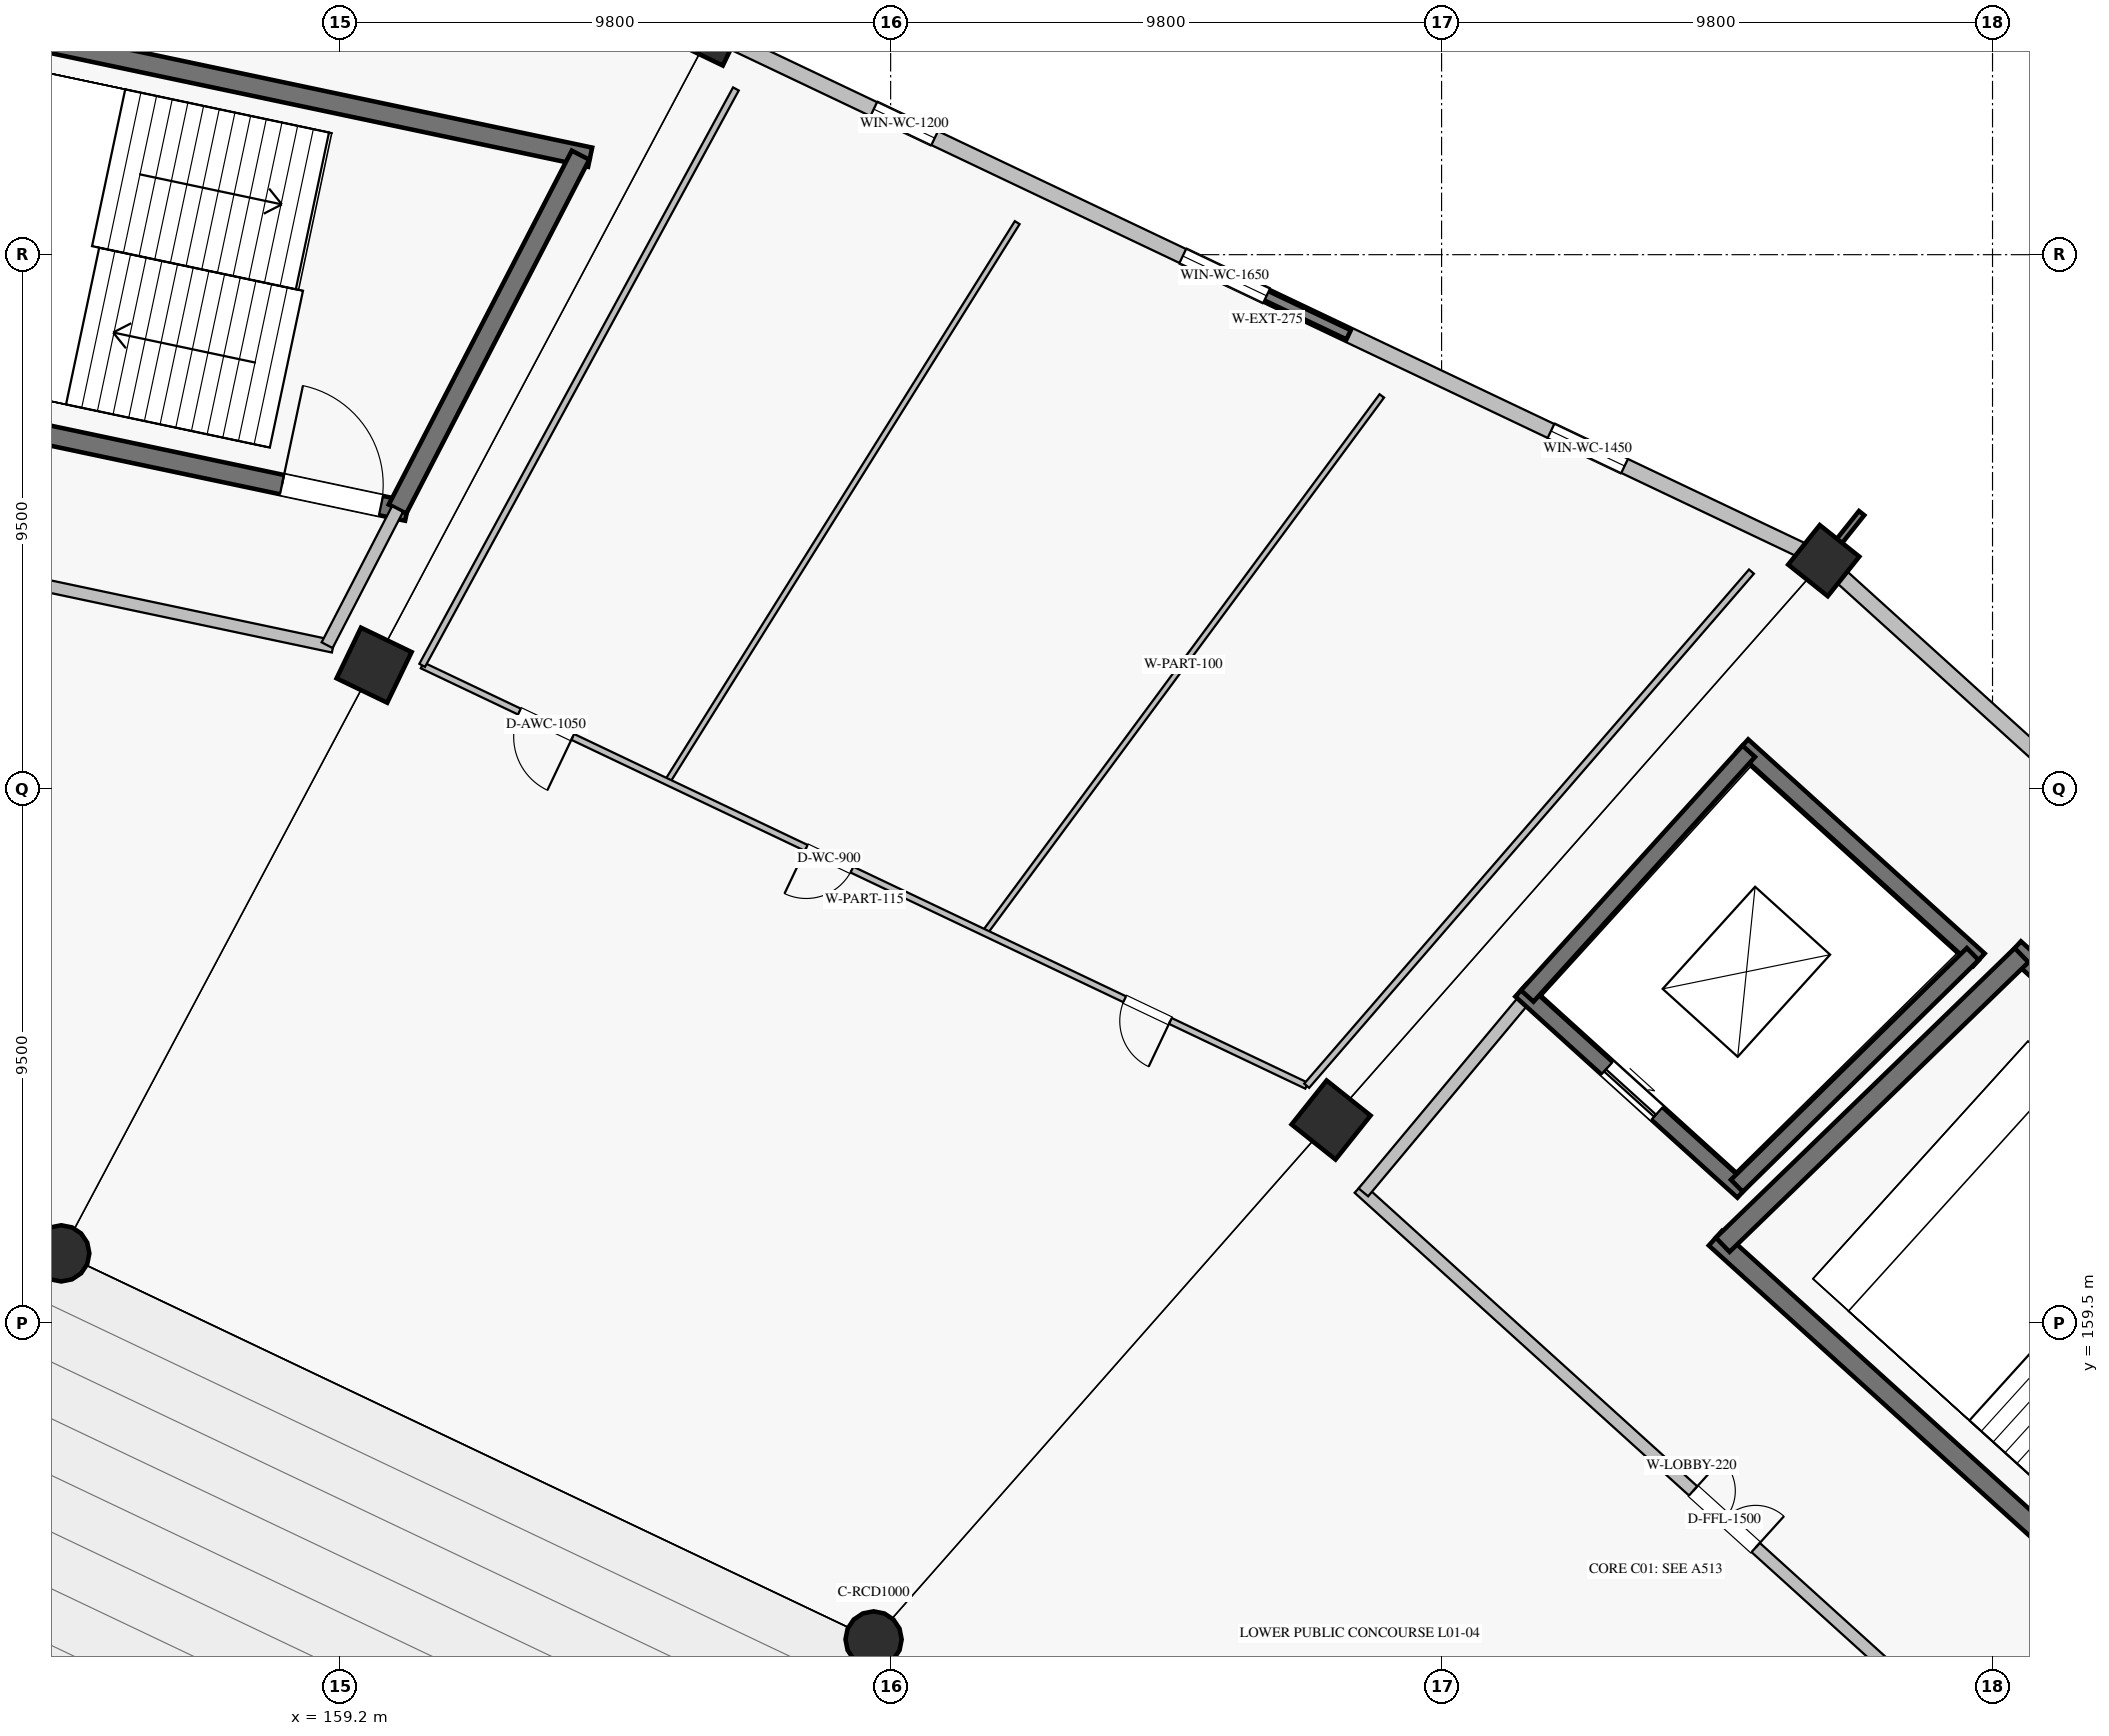
"""IFC4 building model, lengths in metres.
Left out: names, types, materials, properties, quantities, classifications, styles, units other than length and angle.
Written with IfcOpenShell. Run it as: python <this file> out.ifc"""

import sys

from ifc_helpers import new_model, si_unit, direction, frame, frame_2d, origin, origin_2d, place, context, subcontext, project, spatial, rectangle, circle, extrude, element, fill, save


model = new_model("IFC4")
c1 = context("Model", 3, precision=1e-05, world=origin(), true_north=direction((0.0, 1.0)))
c2 = subcontext(c1, "Body", "Model", "MODEL_VIEW")
j1 = project(units=[si_unit("LENGTHUNIT", "METRE"), si_unit("PLANEANGLEUNIT", "RADIAN")], contexts=[c1])
p1 = place(None, origin())
s1 = spatial("IfcSite", under=j1, at=p1, CompositionType="ELEMENT")
p2 = place(p1, origin())
s2 = spatial("IfcBuilding", under=s1, at=p2, CompositionType="ELEMENT")
p3 = place(p2, frame((0.0, 0.0, 5.78)))
s3 = spatial("IfcBuildingStorey", under=s2, at=p3, CompositionType="ELEMENT", Elevation=5.78)
for number, where, z_axis, x_axis in (
    (1, (168.697, 153.873, 0.0), (0.0, 0.0, 1.0), (0.623, 0.782, 0.0)),
    (2, (154.248, 160.739, 0.0), (0.0, 0.0, 1.0), (0.434, 0.901, 0.0)),
):
    element("IfcColumn", number, at=place(p3, frame(where, z_axis=z_axis, x_axis=x_axis)), inside=s3, PredefinedType="COLUMN", context=c2, shape_type="SweptSolid", body=[
        extrude(circle(Radius=0.5, at=origin_2d()), origin(), (0.0, 0.0, 1.0), 4.76),
    ])
for number, where, z_axis, x_axis in (
    (3, (176.834, 163.111, 0.0), (0.0, 0.0, 1.0), (0.623, 0.782, 0.0)),
    (4, (159.812, 171.199, 0.0), (0.0, 0.0, 1.0), (0.434, 0.901, 0.0)),
):
    element("IfcColumn", number, at=place(p3, frame(where, z_axis=z_axis, x_axis=x_axis)), inside=s3, PredefinedType="COLUMN", context=c2, shape_type="SweptSolid", body=[
        extrude(rectangle(XDim=1.0, YDim=1.0, at=origin_2d()), origin(), (0.0, 0.0, 1.0), 4.76),
    ])
for number, where, z_axis, x_axis in (
    (5, (185.598, 173.059, 0.0), (0.0, 0.0, 1.0), (0.623, 0.782, 0.0)),
    (6, (165.805, 182.464, 0.0), (0.0, 0.0, 1.0), (0.434, 0.901, 0.0)),
):
    element("IfcColumn", number, at=place(p3, frame(where, z_axis=z_axis, x_axis=x_axis)), inside=s3, PredefinedType="COLUMN", context=c2, shape_type="SweptSolid", body=[
        extrude(rectangle(XDim=0.9, YDim=0.9, at=origin_2d()), origin(), (0.0, 0.0, 1.0), 4.76),
    ])
p4 = place(p3, frame((201.169, 158.963, 0.0), z_axis=(0.0, 0.0, 1.0), x_axis=(-0.741352367697, 0.671115986183, 0.0)))
e7 = element("IfcWall", 7, at=p4, inside=s3, PredefinedType="SOLIDWALL", context=c2, shape_type="SweptSolid", body=[
    extrude(rectangle(XDim=20.564, YDim=0.275, at=frame_2d((10.282, 0.0))), origin(), (0.0, 0.0, 1.0), 3.798),
])
p5 = place(p4, frame((1.4, 0.0, 1.0)))
e8 = element("IfcOpeningElement", 8, at=p5, cuts=e7, PredefinedType="OPENING", context=c2, shape_type="SweptSolid", body=[
    extrude(rectangle(XDim=2.7, YDim=1.9, at=frame_2d((1.35, 0.95))), frame((0.0, 0.147, 0.0), z_axis=(0.0, -1.0, 0.0), x_axis=(1.0, 0.0, 0.0)), (0.0, 0.0, 1.0), 0.295),
])
p6 = place(p3, frame((185.2, 173.248, 0.0), z_axis=(0.0, 0.0, 1.0), x_axis=(-0.903214855299, 0.429188682478, 0.0)))
e9 = element("IfcWall", 9, at=p6, inside=s3, PredefinedType="SOLIDWALL", context=c2, shape_type="SweptSolid", body=[
    extrude(rectangle(XDim=21.034, YDim=0.275, at=frame_2d((10.517, 0.0))), origin(), (0.0, 0.0, 1.0), 3.798),
])
p7 = place(p6, frame((3.482, 0.0, 1.65)))
e10 = element("IfcOpeningElement", 10, at=p7, cuts=e9, PredefinedType="OPENING", context=c2, shape_type="SweptSolid", body=[
    extrude(rectangle(XDim=1.45, YDim=0.95, at=frame_2d((0.725, 0.475))), frame((0.0, 0.147, 0.0), z_axis=(0.0, -1.0, 0.0), x_axis=(1.0, 0.0, 0.0)), (0.0, 0.0, 1.0), 0.295),
])
p8 = place(p6, frame((10.533, 0.0, 1.65)))
e11 = element("IfcOpeningElement", 11, at=p8, cuts=e9, PredefinedType="OPENING", context=c2, shape_type="SweptSolid", body=[
    extrude(rectangle(XDim=1.65, YDim=1.0, at=frame_2d((0.825, 0.5))), frame((0.0, 0.147, 0.0), z_axis=(0.0, -1.0, 0.0), x_axis=(1.0, 0.0, 0.0)), (0.0, 0.0, 1.0), 0.295),
])
p9 = place(p6, frame((17.069, 0.0, 1.65)))
e12 = element("IfcOpeningElement", 12, at=p9, cuts=e9, PredefinedType="OPENING", context=c2, shape_type="SweptSolid", body=[
    extrude(rectangle(XDim=1.2, YDim=0.9, at=frame_2d((0.6, 0.45))), frame((0.0, 0.147, 0.0), z_axis=(0.0, -1.0, 0.0), x_axis=(1.0, 0.0, 0.0)), (0.0, 0.0, 1.0), 0.295),
])
p10 = place(p3, frame((192.439, 153.072, 0.0), z_axis=(0.0, 0.0, 1.0), x_axis=(-0.741358227035, 0.671109513572, 0.0)))
e13 = element("IfcWall", 13, at=p10, inside=s3, PredefinedType="SHEAR", context=c2, shape_type="SweptSolid", body=[
    extrude(rectangle(XDim=11.827, YDim=0.35, at=frame_2d((5.913, 0.0))), origin(), (0.0, 0.0, 1.0), 4.5),
])
p11 = place(p10, frame((0.475, 0.0, 0.0)))
e14 = element("IfcOpeningElement", 14, at=p11, cuts=e13, PredefinedType="OPENING", context=c2, shape_type="SweptSolid", body=[
    extrude(rectangle(XDim=1.8, YDim=2.2, at=frame_2d((0.9, 1.1))), frame((0.0, 0.185, 0.0), z_axis=(0.0, -1.0, 0.0), x_axis=(1.0, 0.0, 0.0)), (0.0, 0.0, 1.0), 0.37),
])
p12 = place(p3, frame((198.499, 157.548, 0.0), z_axis=(0.0, 0.0, 1.0), x_axis=(-0.741351373721, 0.671117084183, 0.0)))
e15 = element("IfcWall", 15, at=p12, inside=s3, PredefinedType="SHEAR", context=c2, shape_type="SweptSolid", body=[
    extrude(rectangle(XDim=12.83, YDim=0.35, at=frame_2d((6.415, 0.0))), origin(), (0.0, 0.0, 1.0), 4.5),
])
p13 = place(p3, frame((183.801, 160.892, 0.0), z_axis=(0.0, 0.0, 1.0), x_axis=(0.718297398554, 0.69573619083, 0.0)))
e16 = element("IfcWall", 16, at=p13, inside=s3, PredefinedType="SHEAR", context=c2, shape_type="SweptSolid", body=[
    extrude(rectangle(XDim=7.402, YDim=0.35, at=frame_2d((3.701, 0.0))), origin(), (0.0, 0.0, 1.0), 4.5),
])
p14 = place(p3, frame((184.163, 161.841, 0.0), z_axis=(0.0, 0.0, 1.0), x_axis=(-0.741350155641, 0.671118429736, 0.0)))
e17 = element("IfcWall", 17, at=p14, inside=s3, PredefinedType="SHEAR", context=c2, shape_type="SweptSolid", body=[
    extrude(rectangle(XDim=5.329, YDim=0.3, at=frame_2d((2.665, 0.0))), origin(), (0.0, 0.0, 1.0), 4.5),
])
p15 = place(p14, frame((2.065, 0.0, 0.0)))
e18 = element("IfcOpeningElement", 18, at=p15, cuts=e17, PredefinedType="OPENING", context=c2, shape_type="SweptSolid", body=[
    extrude(rectangle(XDim=1.2, YDim=2.2, at=frame_2d((0.6, 1.1))), frame((0.0, 0.16, 0.0), z_axis=(0.0, -1.0, 0.0), x_axis=(1.0, 0.0, 0.0)), (0.0, 0.0, 1.0), 0.32),
])
p16 = place(p3, frame((188.36, 165.961, 0.0), z_axis=(0.0, 0.0, 1.0), x_axis=(-0.74134208775, 0.671127341815, 0.0)))
e19 = element("IfcWall", 19, at=p16, inside=s3, PredefinedType="SHEAR", context=c2, shape_type="SweptSolid", body=[
    extrude(rectangle(XDim=5.675, YDim=0.3, at=frame_2d((2.837, 0.0))), origin(), (0.0, 0.0, 1.0), 4.5),
])
p17 = place(p3, frame((184.052, 161.941, 0.0), z_axis=(0.0, 0.0, 1.0), x_axis=(0.713553028001, 0.700601224828, 0.0)))
e20 = element("IfcWall", 20, at=p17, inside=s3, PredefinedType="SHEAR", context=c2, shape_type="SweptSolid", body=[
    extrude(rectangle(XDim=5.881, YDim=0.3, at=frame_2d((2.94, 0.0))), origin(), (0.0, 0.0, 1.0), 4.5),
])
p18 = place(p3, frame((180.324, 165.316, 0.0), z_axis=(0.0, 0.0, 1.0), x_axis=(0.67115829282, 0.741314067031, 0.0)))
e21 = element("IfcWall", 21, at=p18, inside=s3, PredefinedType="SHEAR", context=c2, shape_type="SweptSolid", body=[
    extrude(rectangle(XDim=5.871, YDim=0.3, at=frame_2d((2.935, 0.0))), origin(), (0.0, 0.0, 1.0), 4.5),
])
p19 = place(p3, frame((189.166, 151.181, 0.0), z_axis=(0.0, 0.0, 1.0), x_axis=(-0.741351035574, 0.671117457717, 0.0)))
e22 = element("IfcWall", 22, at=p19, inside=s3, PredefinedType="SOLIDWALL", context=c2, shape_type="SweptSolid", body=[
    extrude(rectangle(XDim=15.969, YDim=0.22, at=frame_2d((7.985, 0.0))), origin(), (0.0, 0.0, 1.0), 4.5),
])
p20 = place(p19, frame((6.447, 0.0, 0.0)))
e23 = element("IfcOpeningElement", 23, at=p20, cuts=e22, PredefinedType="OPENING", context=c2, shape_type="SweptSolid", body=[
    extrude(rectangle(XDim=1.5, YDim=2.2, at=frame_2d((0.75, 1.1))), frame((0.0, 0.12, 0.0), z_axis=(0.0, -1.0, 0.0), x_axis=(1.0, 0.0, 0.0)), (0.0, 0.0, 1.0), 0.24),
])
p21 = place(p3, frame((177.409, 161.824, 0.0), z_axis=(0.0, 0.0, 1.0), x_axis=(0.640759627034, 0.767741558315, 0.0)))
e24 = element("IfcWall", 24, at=p21, inside=s3, PredefinedType="SOLIDWALL", context=c2, shape_type="SweptSolid", body=[
    extrude(rectangle(XDim=4.549, YDim=0.22, at=frame_2d((2.274, 0.0))), origin(), (0.0, 0.0, 1.0), 4.5),
])
p22 = place(p3, frame((160.4, 173.94, 0.0), z_axis=(0.0, 0.0, 1.0), x_axis=(-0.978345203961, 0.206979858648, 0.0)))
e25 = element("IfcWall", 25, at=p22, inside=s3, PredefinedType="SHEAR", context=c2, shape_type="SweptSolid", body=[
    extrude(rectangle(XDim=12.044, YDim=0.35, at=frame_2d((6.022, 0.0))), origin(), (0.0, 0.0, 1.0), 4.5),
])
p23 = place(p22, frame((0.475, 0.0, 0.0)))
e26 = element("IfcOpeningElement", 26, at=p23, cuts=e25, PredefinedType="OPENING", context=c2, shape_type="SweptSolid", body=[
    extrude(rectangle(XDim=1.8, YDim=2.2, at=frame_2d((0.9, 1.1))), frame((0.0, 0.185, 0.0), z_axis=(0.0, -1.0, 0.0), x_axis=(1.0, 0.0, 0.0)), (0.0, 0.0, 1.0), 0.37),
])
p24 = place(p3, frame((163.655, 180.233, 0.0), z_axis=(0.0, 0.0, 1.0), x_axis=(-0.978345119536, 0.206980257705, 0.0)))
e27 = element("IfcWall", 27, at=p24, inside=s3, PredefinedType="SHEAR", context=c2, shape_type="SweptSolid", body=[
    extrude(rectangle(XDim=13.067, YDim=0.35, at=frame_2d((6.533, 0.0))), origin(), (0.0, 0.0, 1.0), 4.5),
])
p25 = place(p3, frame((160.229, 173.976, 0.0), z_axis=(0.0, 0.0, 1.0), x_axis=(0.459409796564, 0.888224430435, 0.0)))
e28 = element("IfcWall", 28, at=p25, inside=s3, PredefinedType="SHEAR", context=c2, shape_type="SweptSolid", body=[
    extrude(rectangle(XDim=7.086, YDim=0.35, at=frame_2d((3.543, 0.0))), origin(), (0.0, 0.0, 1.0), 4.5),
])
p26 = place(p3, frame((159.084, 171.532, 0.0), z_axis=(0.0, 0.0, 1.0), x_axis=(-0.978342313718, 0.206993519678, 0.0)))
e29 = element("IfcWall", 29, at=p26, inside=s3, PredefinedType="SOLIDWALL", context=c2, shape_type="SweptSolid", body=[
    extrude(rectangle(XDim=16.983, YDim=0.22, at=frame_2d((8.492, 0.0))), origin(), (0.0, 0.0, 1.0), 3.448),
])
p27 = place(p26, frame((6.903, 0.0, 0.0)))
e30 = element("IfcOpeningElement", 30, at=p27, cuts=e29, PredefinedType="OPENING", context=c2, shape_type="SweptSolid", body=[
    extrude(rectangle(XDim=1.5, YDim=2.2, at=frame_2d((0.75, 1.1))), frame((0.0, 0.12, 0.0), z_axis=(0.0, -1.0, 0.0), x_axis=(1.0, 0.0, 0.0)), (0.0, 0.0, 1.0), 0.24),
])
p28 = place(p3, frame((158.976, 171.555, 0.0), z_axis=(0.0, 0.0, 1.0), x_axis=(0.459461910618, 0.888197473928, 0.0)))
e31 = element("IfcWall", 31, at=p28, inside=s3, PredefinedType="SOLIDWALL", context=c2, shape_type="SweptSolid", body=[
    extrude(rectangle(XDim=2.725, YDim=0.22, at=frame_2d((1.363, 0.0))), origin(), (0.0, 0.0, 1.0), 4.5),
])
p29 = place(p3, frame((176.401, 163.72, 0.0), z_axis=(0.0, 0.0, 1.0), x_axis=(-0.903217202186, 0.429183743488, 0.0)))
e32 = element("IfcWall", 32, at=p29, inside=s3, PredefinedType="PARTITIONING", context=c2, shape_type="SweptSolid", body=[
    extrude(rectangle(XDim=17.419, YDim=0.115, at=frame_2d((8.709, 0.0))), origin(), (0.0, 0.0, 1.0), 3.82),
])
p30 = place(p29, frame((2.685, 0.0, 0.0)))
e33 = element("IfcOpeningElement", 33, at=p30, cuts=e32, PredefinedType="OPENING", context=c2, shape_type="SweptSolid", body=[
    extrude(rectangle(XDim=0.9, YDim=2.1, at=frame_2d((0.45, 1.05))), frame((0.0, 0.067, 0.0), z_axis=(0.0, -1.0, 0.0), x_axis=(1.0, 0.0, 0.0)), (0.0, 0.0, 1.0), 0.135),
])
p31 = place(p29, frame((8.956, 0.0, 0.0)))
e34 = element("IfcOpeningElement", 34, at=p31, cuts=e32, PredefinedType="OPENING", context=c2, shape_type="SweptSolid", body=[
    extrude(rectangle(XDim=0.9, YDim=2.1, at=frame_2d((0.45, 1.05))), frame((0.0, 0.067, 0.0), z_axis=(0.0, -1.0, 0.0), x_axis=(1.0, 0.0, 0.0)), (0.0, 0.0, 1.0), 0.135),
])
p32 = place(p29, frame((14.455, 0.0, 0.0)))
e35 = element("IfcOpeningElement", 35, at=p32, cuts=e32, PredefinedType="OPENING", context=c2, shape_type="SweptSolid", body=[
    extrude(rectangle(XDim=1.05, YDim=2.1, at=frame_2d((0.525, 1.05))), frame((0.0, 0.067, 0.0), z_axis=(0.0, -1.0, 0.0), x_axis=(1.0, 0.0, 0.0)), (0.0, 0.0, 1.0), 0.135),
])
p33 = place(p3, frame((176.401, 163.72, 0.0), z_axis=(0.0, 0.0, 1.0), x_axis=(0.654293035882, 0.756241114458, 0.0)))
e36 = element("IfcWall", 36, at=p33, inside=s3, PredefinedType="PARTITIONING", context=c2, shape_type="SweptSolid", body=[
    extrude(rectangle(XDim=12.091, YDim=0.115, at=frame_2d((6.045, 0.0))), origin(), (0.0, 0.0, 1.0), 3.82),
])
p34 = place(p3, frame((160.667, 171.196, 0.0), z_axis=(0.0, 0.0, 1.0), x_axis=(0.478125060974, 0.878291765912, 0.0)))
e37 = element("IfcWall", 37, at=p34, inside=s3, PredefinedType="PARTITIONING", context=c2, shape_type="SweptSolid", body=[
    extrude(rectangle(XDim=11.672, YDim=0.115, at=frame_2d((5.836, 0.0))), origin(), (0.0, 0.0, 1.0), 3.82),
])
p35 = place(p3, frame((170.674, 166.441, 0.0), z_axis=(0.0, 0.0, 1.0), x_axis=(0.594760374645, 0.803903039397, 0.0)))
e38 = element("IfcWall", 38, at=p35, inside=s3, PredefinedType="PARTITIONING", context=c2, shape_type="SweptSolid", body=[
    extrude(rectangle(XDim=11.875, YDim=0.1, at=frame_2d((5.938, 0.0))), origin(), (0.0, 0.0, 1.0), 3.82),
])
p36 = place(p3, frame((165.025, 169.125, 0.0), z_axis=(0.0, 0.0, 1.0), x_axis=(0.530664656497, 0.847581867636, 0.0)))
e39 = element("IfcWall", 39, at=p36, inside=s3, PredefinedType="PARTITIONING", context=c2, shape_type="SweptSolid", body=[
    extrude(rectangle(XDim=11.733, YDim=0.1, at=frame_2d((5.866, 0.0))), origin(), (0.0, 0.0, 1.0), 3.82),
])
p37 = place(p7, origin())
e40 = element("IfcWindow", 40, at=p37, inside=s3, PartitioningType="SINGLE_PANEL", PredefinedType="WINDOW", context=c2, shape_type="SweptSolid", body=[
    extrude(rectangle(XDim=1.45, YDim=0.95, at=frame_2d((0.725, 0.475))), frame((0.0, 0.03, 0.0), z_axis=(0.0, -1.0, 0.0), x_axis=(1.0, 0.0, 0.0)), (0.0, 0.0, 1.0), 0.06),
])
fill(e10, e40)
p38 = place(p8, origin())
e41 = element("IfcWindow", 41, at=p38, inside=s3, PartitioningType="SINGLE_PANEL", PredefinedType="WINDOW", context=c2, shape_type="SweptSolid", body=[
    extrude(rectangle(XDim=1.65, YDim=1.0, at=frame_2d((0.825, 0.5))), frame((0.0, 0.03, 0.0), z_axis=(0.0, -1.0, 0.0), x_axis=(1.0, 0.0, 0.0)), (0.0, 0.0, 1.0), 0.06),
])
fill(e11, e41)
p39 = place(p9, origin())
e42 = element("IfcWindow", 42, at=p39, inside=s3, PartitioningType="SINGLE_PANEL", PredefinedType="WINDOW", context=c2, shape_type="SweptSolid", body=[
    extrude(rectangle(XDim=1.2, YDim=0.9, at=frame_2d((0.6, 0.45))), frame((0.0, 0.03, 0.0), z_axis=(0.0, -1.0, 0.0), x_axis=(1.0, 0.0, 0.0)), (0.0, 0.0, 1.0), 0.06),
])
fill(e12, e42)
p40 = place(p15, origin())
e43 = element("IfcDoor", 43, at=p40, inside=s3, OperationType="SLIDING_TO_LEFT", PredefinedType="DOOR", context=c2, shape_type="SweptSolid", body=[
    extrude(rectangle(XDim=1.2, YDim=2.2, at=frame_2d((0.6, 1.1))), frame((0.0, 0.025, 0.0), z_axis=(0.0, -1.0, 0.0), x_axis=(1.0, 0.0, 0.0)), (0.0, 0.0, 1.0), 0.05),
])
fill(e18, e43)
p41 = place(p20, frame((1.5, 0.0, 0.0), z_axis=(0.0, 0.0, 1.0), x_axis=(-1.0, 0.0, 0.0)))
e44 = element("IfcDoor", 44, at=p41, inside=s3, OperationType="DOUBLE_DOOR_SINGLE_SWING", PredefinedType="DOOR", context=c2, shape_type="SweptSolid", body=[
    extrude(rectangle(XDim=1.5, YDim=2.2, at=frame_2d((0.75, 1.1))), frame((0.0, 0.025, 0.0), z_axis=(0.0, -1.0, 0.0), x_axis=(1.0, 0.0, 0.0)), (0.0, 0.0, 1.0), 0.05),
])
fill(e23, e44)
p42 = place(p23, frame((1.8, 0.0, 0.0), z_axis=(0.0, 0.0, 1.0), x_axis=(-1.0, 0.0, 0.0)))
e45 = element("IfcDoor", 45, at=p42, inside=s3, OperationType="SINGLE_SWING_LEFT", PredefinedType="DOOR", context=c2, shape_type="SweptSolid", body=[
    extrude(rectangle(XDim=1.8, YDim=2.2, at=frame_2d((0.9, 1.1))), frame((0.0, 0.025, 0.0), z_axis=(0.0, -1.0, 0.0), x_axis=(1.0, 0.0, 0.0)), (0.0, 0.0, 1.0), 0.05),
])
fill(e26, e45)
p43 = place(p30, origin())
e46 = element("IfcDoor", 46, at=p43, inside=s3, OperationType="SINGLE_SWING_LEFT", PredefinedType="DOOR", context=c2, shape_type="SweptSolid", body=[
    extrude(rectangle(XDim=0.9, YDim=2.1, at=frame_2d((0.45, 1.05))), frame((0.0, 0.025, 0.0), z_axis=(0.0, -1.0, 0.0), x_axis=(1.0, 0.0, 0.0)), (0.0, 0.0, 1.0), 0.05),
])
fill(e33, e46)
p44 = place(p31, origin())
e47 = element("IfcDoor", 47, at=p44, inside=s3, OperationType="SINGLE_SWING_RIGHT", PredefinedType="DOOR", context=c2, shape_type="SweptSolid", body=[
    extrude(rectangle(XDim=0.9, YDim=2.1, at=frame_2d((0.45, 1.05))), frame((0.0, 0.025, 0.0), z_axis=(0.0, -1.0, 0.0), x_axis=(1.0, 0.0, 0.0)), (0.0, 0.0, 1.0), 0.05),
])
fill(e34, e47)
p45 = place(p32, origin())
e48 = element("IfcDoor", 48, at=p45, inside=s3, OperationType="SINGLE_SWING_LEFT", PredefinedType="DOOR", context=c2, shape_type="SweptSolid", body=[
    extrude(rectangle(XDim=1.05, YDim=2.1, at=frame_2d((0.525, 1.05))), frame((0.0, 0.025, 0.0), z_axis=(0.0, -1.0, 0.0), x_axis=(1.0, 0.0, 0.0)), (0.0, 0.0, 1.0), 0.05),
])
fill(e35, e48)
save(model, sys.argv[1])
